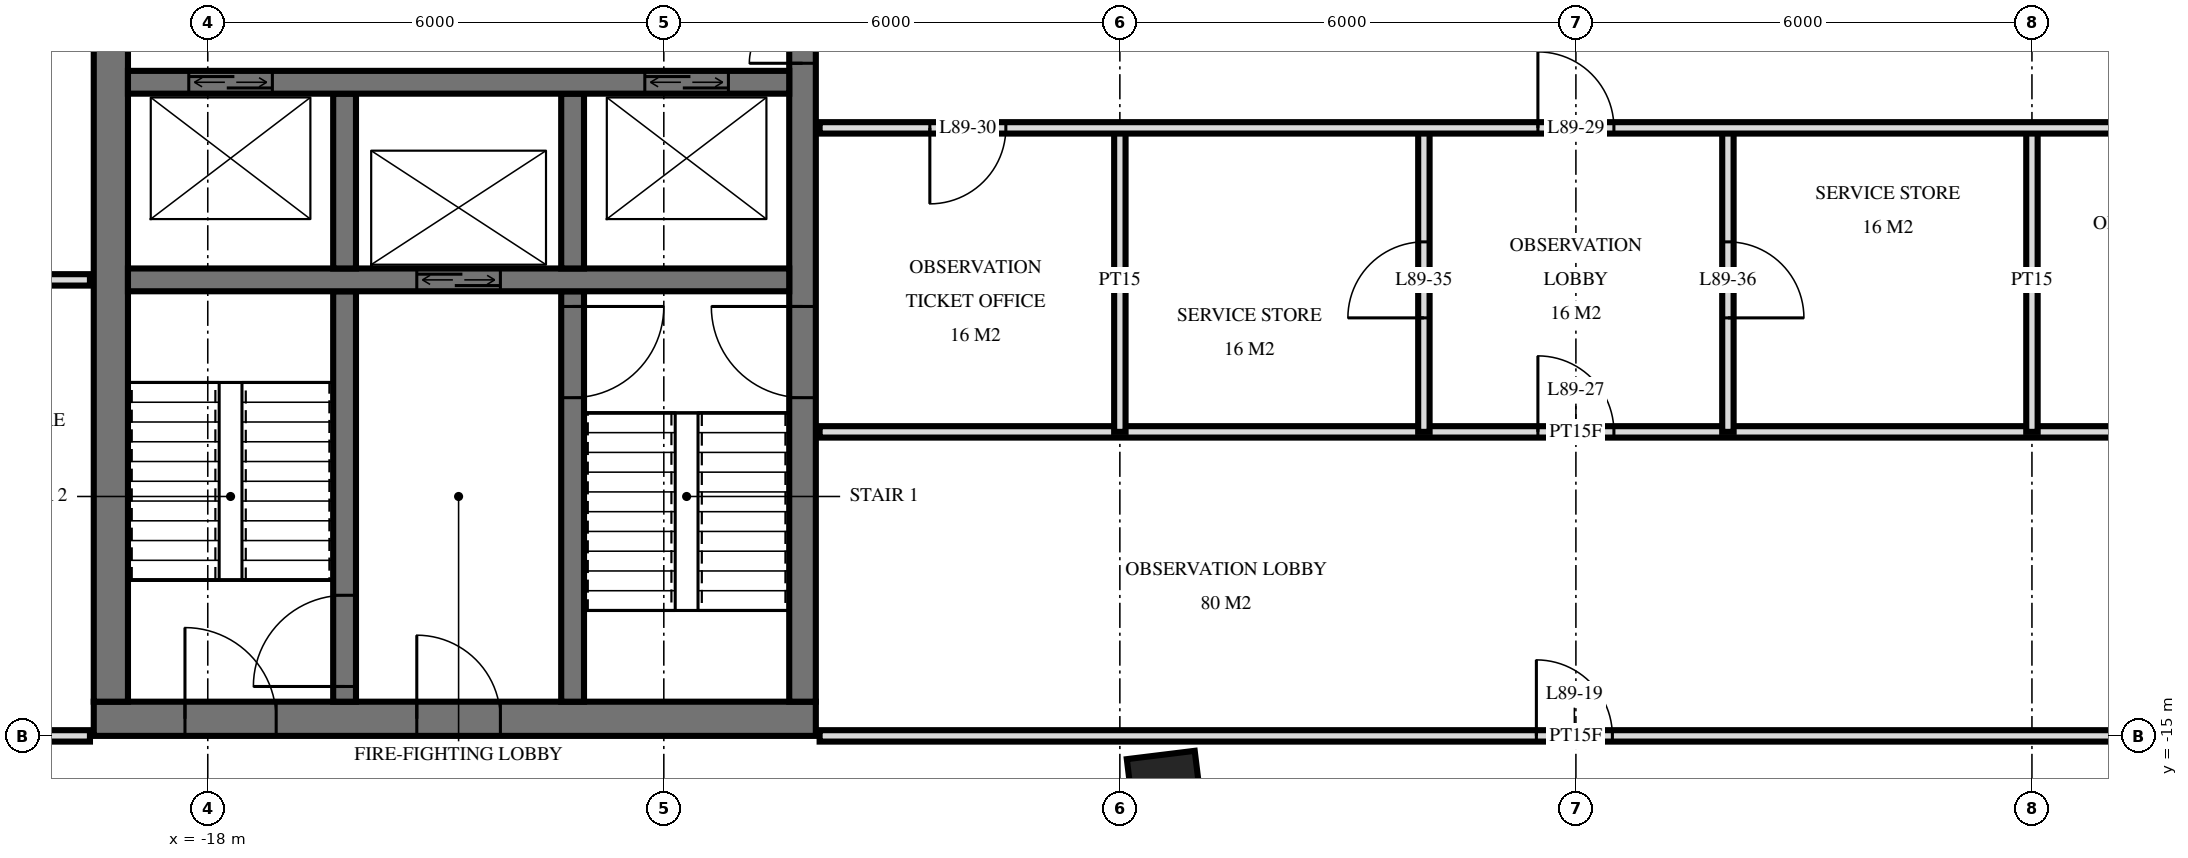
"""IFC4 building model, lengths in metres.
Left out: names, types, materials, properties, quantities, classifications, styles, units other than length and angle.
Written with IfcOpenShell. Run it as: python <this file> out.ifc"""

import sys

from ifc_helpers import new_model, si_unit, direction, frame, frame_2d, origin, origin_2d, place, context, subcontext, project, spatial, rectangle, extrude, element, fill, save


model = new_model("IFC4")
c1 = context("Model", 3, precision=1e-05, world=origin(), true_north=direction((0.0, 1.0)))
c2 = subcontext(c1, "Body", "Model", "MODEL_VIEW")
j1 = project(units=[si_unit("LENGTHUNIT", "METRE"), si_unit("PLANEANGLEUNIT", "RADIAN")], contexts=[c1])
p1 = place(None, origin())
s1 = spatial("IfcSite", under=j1, at=p1, CompositionType="ELEMENT")
p2 = place(p1, origin())
s2 = spatial("IfcBuilding", under=s1, at=p2, CompositionType="ELEMENT")
p3 = place(p2, frame((0.0, 0.0, 338.6)))
s3 = spatial("IfcBuildingStorey", under=s2, at=p3, CompositionType="ELEMENT", Elevation=338.6)
p4 = place(p3, frame((-5.407, -15.698, 0.0), z_axis=(0.0, 0.0, 1.0), x_axis=(0.992546151641, 0.121869343405, 0.0)))
e1 = element("IfcColumn", 1, at=p4, inside=s3, PredefinedType="COLUMN", context=c2, shape_type="SweptSolid", body=[
    extrude(rectangle(XDim=0.9, YDim=0.9, at=origin_2d()), origin(), (0.0, 0.0, 1.0), 4.0),
])
p5 = place(p3, frame((-19.5, -14.775, 0.0), z_axis=(0.0, 0.0, 1.0), x_axis=(1.0, 0.0, 0.0)))
e2 = element("IfcWall", 2, at=p5, inside=s3, PredefinedType="SHEAR", context=c2, shape_type="SweptSolid", body=[
    extrude(rectangle(XDim=9.5, YDim=0.45, at=frame_2d((4.75, 0.0))), origin(), (0.0, 0.0, 1.0), 4.0),
])
p6 = place(p5, frame((1.2, 0.0, 0.0)))
e3 = element("IfcOpeningElement", 3, at=p6, cuts=e2, PredefinedType="OPENING", context=c2, shape_type="SweptSolid", body=[
    extrude(rectangle(XDim=1.2, YDim=2.1, at=frame_2d((0.6, 1.05))), frame((0.0, 0.235, 0.0), z_axis=(0.0, -1.0, 0.0), x_axis=(1.0, 0.0, 0.0)), (0.0, 0.0, 1.0), 0.47),
])
p7 = place(p5, frame((4.25, 0.0, 0.0)))
e4 = element("IfcOpeningElement", 4, at=p7, cuts=e2, PredefinedType="OPENING", context=c2, shape_type="SweptSolid", body=[
    extrude(rectangle(XDim=1.1, YDim=2.1, at=frame_2d((0.55, 1.05))), frame((0.0, 0.235, 0.0), z_axis=(0.0, -1.0, 0.0), x_axis=(1.0, 0.0, 0.0)), (0.0, 0.0, 1.0), 0.47),
])
p8 = place(p3, frame((-10.175, -14.55, 0.0), z_axis=(0.0, 0.0, 1.0), x_axis=(0.0, 1.0, 0.0)))
e5 = element("IfcWall", 5, at=p8, inside=s3, PredefinedType="SHEAR", context=c2, shape_type="SweptSolid", body=[
    extrude(rectangle(XDim=14.1, YDim=0.35, at=frame_2d((7.05, 0.0))), origin(), (0.0, 0.0, 1.0), 4.0),
])
p9 = place(p8, frame((8.4, 0.0, 0.0)))
e6 = element("IfcOpeningElement", 6, at=p9, cuts=e5, PredefinedType="OPENING", context=c2, shape_type="SweptSolid", body=[
    extrude(rectangle(XDim=1.4, YDim=2.4, at=frame_2d((0.7, 1.2))), frame((0.0, 0.185, 0.0), z_axis=(0.0, -1.0, 0.0), x_axis=(1.0, 0.0, 0.0)), (0.0, 0.0, 1.0), 0.37),
])
p10 = place(p8, frame((10.0, 0.0, 0.0)))
e7 = element("IfcOpeningElement", 7, at=p10, cuts=e5, PredefinedType="OPENING", context=c2, shape_type="SweptSolid", body=[
    extrude(rectangle(XDim=1.4, YDim=2.4, at=frame_2d((0.7, 1.2))), frame((0.0, 0.185, 0.0), z_axis=(0.0, -1.0, 0.0), x_axis=(1.0, 0.0, 0.0)), (0.0, 0.0, 1.0), 0.37),
])
p11 = place(p8, frame((4.0, 0.0, 0.0)))
e8 = element("IfcOpeningElement", 8, at=p11, cuts=e5, PredefinedType="OPENING", context=c2, shape_type="SweptSolid", body=[
    extrude(rectangle(XDim=1.2, YDim=2.1, at=frame_2d((0.6, 1.05))), frame((0.0, 0.185, 0.0), z_axis=(0.0, -1.0, 0.0), x_axis=(1.0, 0.0, 0.0)), (0.0, 0.0, 1.0), 0.37),
])
p12 = place(p3, frame((-19.275, -14.55, 0.0), z_axis=(0.0, 0.0, 1.0), x_axis=(0.0, 1.0, 0.0)))
e9 = element("IfcWall", 9, at=p12, inside=s3, PredefinedType="SHEAR", context=c2, shape_type="SweptSolid", body=[
    extrude(rectangle(XDim=14.1, YDim=0.45, at=frame_2d((7.05, 0.0))), origin(), (0.0, 0.0, 1.0), 4.0),
])
p13 = place(p3, frame((-19.05, -6.4, 0.0), z_axis=(0.0, 0.0, 1.0), x_axis=(1.0, 0.0, 0.0)))
e10 = element("IfcWall", 10, at=p13, inside=s3, PredefinedType="SHEAR", context=c2, shape_type="SweptSolid", body=[
    extrude(rectangle(XDim=8.7, YDim=0.3, at=frame_2d((4.35, 0.0))), origin(), (0.0, 0.0, 1.0), 4.0),
])
p14 = place(p13, frame((6.8, 0.0, 0.0)))
e11 = element("IfcOpeningElement", 11, at=p14, cuts=e10, PredefinedType="OPENING", context=c2, shape_type="SweptSolid", body=[
    extrude(rectangle(XDim=1.1, YDim=2.1, at=frame_2d((0.55, 1.05))), frame((0.0, 0.16, 0.0), z_axis=(0.0, -1.0, 0.0), x_axis=(1.0, 0.0, 0.0)), (0.0, 0.0, 1.0), 0.32),
])
p15 = place(p13, frame((0.8, 0.0, 0.0)))
e12 = element("IfcOpeningElement", 12, at=p15, cuts=e10, PredefinedType="OPENING", context=c2, shape_type="SweptSolid", body=[
    extrude(rectangle(XDim=1.1, YDim=2.1, at=frame_2d((0.55, 1.05))), frame((0.0, 0.16, 0.0), z_axis=(0.0, -1.0, 0.0), x_axis=(1.0, 0.0, 0.0)), (0.0, 0.0, 1.0), 0.32),
])
p16 = place(p3, frame((-19.05, -9.0, 0.0), z_axis=(0.0, 0.0, 1.0), x_axis=(1.0, 0.0, 0.0)))
e13 = element("IfcWall", 13, at=p16, inside=s3, PredefinedType="SHEAR", context=c2, shape_type="SweptSolid", body=[
    extrude(rectangle(XDim=8.7, YDim=0.3, at=frame_2d((4.35, 0.0))), origin(), (0.0, 0.0, 1.0), 4.0),
])
p17 = place(p16, frame((3.8, 0.0, 0.0)))
e14 = element("IfcOpeningElement", 14, at=p17, cuts=e13, PredefinedType="OPENING", context=c2, shape_type="SweptSolid", body=[
    extrude(rectangle(XDim=1.1, YDim=2.1, at=frame_2d((0.55, 1.05))), frame((0.0, 0.16, 0.0), z_axis=(0.0, -1.0, 0.0), x_axis=(1.0, 0.0, 0.0)), (0.0, 0.0, 1.0), 0.32),
])
p18 = place(p3, frame((-13.2, -8.85, 0.0), z_axis=(0.0, 0.0, 1.0), x_axis=(0.0, 1.0, 0.0)))
e15 = element("IfcWall", 15, at=p18, inside=s3, PredefinedType="SHEAR", context=c2, shape_type="SweptSolid", body=[
    extrude(rectangle(XDim=2.3, YDim=0.3, at=frame_2d((1.15, 0.0))), origin(), (0.0, 0.0, 1.0), 4.0),
])
p19 = place(p3, frame((-13.2, -14.55, 0.0), z_axis=(0.0, 0.0, 1.0), x_axis=(0.0, 1.0, 0.0)))
e16 = element("IfcWall", 16, at=p19, inside=s3, PredefinedType="SHEAR", context=c2, shape_type="SweptSolid", body=[
    extrude(rectangle(XDim=5.4, YDim=0.3, at=frame_2d((2.7, 0.0))), origin(), (0.0, 0.0, 1.0), 4.0),
])
p20 = place(p19, frame((4.0, 0.0, 0.0)))
e17 = element("IfcOpeningElement", 17, at=p20, cuts=e16, PredefinedType="OPENING", context=c2, shape_type="SweptSolid", body=[
    extrude(rectangle(XDim=1.2, YDim=2.1, at=frame_2d((0.6, 1.05))), frame((0.0, 0.16, 0.0), z_axis=(0.0, -1.0, 0.0), x_axis=(1.0, 0.0, 0.0)), (0.0, 0.0, 1.0), 0.32),
])
p21 = place(p3, frame((-16.2, -8.85, 0.0), z_axis=(0.0, 0.0, 1.0), x_axis=(0.0, 1.0, 0.0)))
e18 = element("IfcWall", 18, at=p21, inside=s3, PredefinedType="SHEAR", context=c2, shape_type="SweptSolid", body=[
    extrude(rectangle(XDim=2.3, YDim=0.3, at=frame_2d((1.15, 0.0))), origin(), (0.0, 0.0, 1.0), 4.0),
])
p22 = place(p3, frame((-16.2, -14.55, 0.0), z_axis=(0.0, 0.0, 1.0), x_axis=(0.0, 1.0, 0.0)))
e19 = element("IfcWall", 19, at=p22, inside=s3, PredefinedType="SHEAR", context=c2, shape_type="SweptSolid", body=[
    extrude(rectangle(XDim=5.4, YDim=0.3, at=frame_2d((2.7, 0.0))), origin(), (0.0, 0.0, 1.0), 4.0),
])
p23 = place(p22, frame((0.2, 0.0, 0.0)))
e20 = element("IfcOpeningElement", 20, at=p23, cuts=e19, PredefinedType="OPENING", context=c2, shape_type="SweptSolid", body=[
    extrude(rectangle(XDim=1.2, YDim=2.1, at=frame_2d((0.6, 1.05))), frame((0.0, 0.16, 0.0), z_axis=(0.0, -1.0, 0.0), x_axis=(1.0, 0.0, 0.0)), (0.0, 0.0, 1.0), 0.32),
])
p24 = place(p3, frame((6.0, -11.0, 0.0), z_axis=(0.0, 0.0, 1.0), x_axis=(0.0, 1.0, 0.0)))
e21 = element("IfcWall", 21, at=p24, inside=s3, PredefinedType="PARTITIONING", context=c2, shape_type="SweptSolid", body=[
    extrude(rectangle(XDim=4.0, YDim=0.15, at=frame_2d((2.0, 0.0))), origin(), (0.0, 0.0, 1.0), 3.72),
])
p25 = place(p3, frame((2.0, -11.0, 0.0), z_axis=(0.0, 0.0, 1.0), x_axis=(0.0, 1.0, 0.0)))
e22 = element("IfcWall", 22, at=p25, inside=s3, PredefinedType="PARTITIONING", context=c2, shape_type="SweptSolid", body=[
    extrude(rectangle(XDim=4.0, YDim=0.15, at=frame_2d((2.0, 0.0))), origin(), (0.0, 0.0, 1.0), 3.72),
])
p26 = place(p25, frame((1.5, 0.0, 0.0)))
e23 = element("IfcOpeningElement", 23, at=p26, cuts=e22, PredefinedType="OPENING", context=c2, shape_type="SweptSolid", body=[
    extrude(rectangle(XDim=1.0, YDim=2.1, at=frame_2d((0.5, 1.05))), frame((0.0, 0.085, 0.0), z_axis=(0.0, -1.0, 0.0), x_axis=(1.0, 0.0, 0.0)), (0.0, 0.0, 1.0), 0.17),
])
p27 = place(p3, frame((-2.0, -11.0, 0.0), z_axis=(0.0, 0.0, 1.0), x_axis=(0.0, 1.0, 0.0)))
e24 = element("IfcWall", 24, at=p27, inside=s3, PredefinedType="PARTITIONING", context=c2, shape_type="SweptSolid", body=[
    extrude(rectangle(XDim=4.0, YDim=0.15, at=frame_2d((2.0, 0.0))), origin(), (0.0, 0.0, 1.0), 3.72),
])
p28 = place(p27, frame((1.5, 0.0, 0.0)))
e25 = element("IfcOpeningElement", 25, at=p28, cuts=e24, PredefinedType="OPENING", context=c2, shape_type="SweptSolid", body=[
    extrude(rectangle(XDim=1.0, YDim=2.1, at=frame_2d((0.5, 1.05))), frame((0.0, 0.085, 0.0), z_axis=(0.0, -1.0, 0.0), x_axis=(1.0, 0.0, 0.0)), (0.0, 0.0, 1.0), 0.17),
])
p29 = place(p3, frame((-6.0, -11.0, 0.0), z_axis=(0.0, 0.0, 1.0), x_axis=(0.0, 1.0, 0.0)))
e26 = element("IfcWall", 26, at=p29, inside=s3, PredefinedType="PARTITIONING", context=c2, shape_type="SweptSolid", body=[
    extrude(rectangle(XDim=4.0, YDim=0.15, at=frame_2d((2.0, 0.0))), origin(), (0.0, 0.0, 1.0), 3.72),
])
p30 = place(p3, frame((-21.935, -15.0, 0.0), z_axis=(0.0, 0.0, 1.0), x_axis=(1.0, 0.0, 0.0)))
e27 = element("IfcWall", 27, at=p30, inside=s3, PredefinedType="PARTITIONING", context=c2, shape_type="SweptSolid", body=[
    extrude(rectangle(XDim=2.385, YDim=0.15, at=frame_2d((1.192, 0.0))), origin(), (0.0, 0.0, 1.0), 3.72),
])
p31 = place(p30, frame((0.627, 0.0, 0.0)))
e28 = element("IfcOpeningElement", 28, at=p31, cuts=e27, PredefinedType="OPENING", context=c2, shape_type="SweptSolid", body=[
    extrude(rectangle(XDim=1.0, YDim=2.1, at=frame_2d((0.5, 1.05))), frame((0.0, 0.085, 0.0), z_axis=(0.0, -1.0, 0.0), x_axis=(1.0, 0.0, 0.0)), (0.0, 0.0, 1.0), 0.17),
])
p32 = place(p3, frame((-9.95, -15.0, 0.0), z_axis=(0.0, 0.0, 1.0), x_axis=(1.0, 0.0, 0.0)))
e29 = element("IfcWall", 29, at=p32, inside=s3, PredefinedType="PARTITIONING", context=c2, shape_type="SweptSolid", body=[
    extrude(rectangle(XDim=19.9, YDim=0.15, at=frame_2d((9.95, 0.0))), origin(), (0.0, 0.0, 1.0), 3.084),
])
p33 = place(p32, frame((9.43, 0.0, 0.0)))
e30 = element("IfcOpeningElement", 30, at=p33, cuts=e29, PredefinedType="OPENING", context=c2, shape_type="SweptSolid", body=[
    extrude(rectangle(XDim=1.0, YDim=2.1, at=frame_2d((0.5, 1.05))), frame((0.0, 0.085, 0.0), z_axis=(0.0, -1.0, 0.0), x_axis=(1.0, 0.0, 0.0)), (0.0, 0.0, 1.0), 0.17),
])
p34 = place(p3, frame((-9.95, -11.0, 0.0), z_axis=(0.0, 0.0, 1.0), x_axis=(1.0, 0.0, 0.0)))
e31 = element("IfcWall", 31, at=p34, inside=s3, PredefinedType="PARTITIONING", context=c2, shape_type="SweptSolid", body=[
    extrude(rectangle(XDim=19.9, YDim=0.15, at=frame_2d((9.95, 0.0))), origin(), (0.0, 0.0, 1.0), 3.72),
])
p35 = place(p34, frame((9.45, 0.0, 0.0)))
e32 = element("IfcOpeningElement", 32, at=p35, cuts=e31, PredefinedType="OPENING", context=c2, shape_type="SweptSolid", body=[
    extrude(rectangle(XDim=1.0, YDim=2.1, at=frame_2d((0.5, 1.05))), frame((0.0, 0.085, 0.0), z_axis=(0.0, -1.0, 0.0), x_axis=(1.0, 0.0, 0.0)), (0.0, 0.0, 1.0), 0.17),
])
p36 = place(p34, frame((17.45, 0.0, 0.0)))
e33 = element("IfcOpeningElement", 33, at=p36, cuts=e31, PredefinedType="OPENING", context=c2, shape_type="SweptSolid", body=[
    extrude(rectangle(XDim=1.0, YDim=2.1, at=frame_2d((0.5, 1.05))), frame((0.0, 0.085, 0.0), z_axis=(0.0, -1.0, 0.0), x_axis=(1.0, 0.0, 0.0)), (0.0, 0.0, 1.0), 0.17),
])
p37 = place(p3, frame((-22.672, -9.0, 0.0), z_axis=(0.0, 0.0, 1.0), x_axis=(1.0, 0.0, 0.0)))
e34 = element("IfcWall", 34, at=p37, inside=s3, PredefinedType="PARTITIONING", context=c2, shape_type="SweptSolid", body=[
    extrude(rectangle(XDim=3.122, YDim=0.15, at=frame_2d((1.561, 0.0))), origin(), (0.0, 0.0, 1.0), 3.72),
])
p38 = place(p37, frame((1.045, 0.0, 0.0)))
e35 = element("IfcOpeningElement", 35, at=p38, cuts=e34, PredefinedType="OPENING", context=c2, shape_type="SweptSolid", body=[
    extrude(rectangle(XDim=0.9, YDim=2.1, at=frame_2d((0.45, 1.05))), frame((0.0, 0.085, 0.0), z_axis=(0.0, -1.0, 0.0), x_axis=(1.0, 0.0, 0.0)), (0.0, 0.0, 1.0), 0.17),
])
p39 = place(p3, frame((-9.95, -7.0, 0.0), z_axis=(0.0, 0.0, 1.0), x_axis=(1.0, 0.0, 0.0)))
e36 = element("IfcWall", 36, at=p39, inside=s3, PredefinedType="PARTITIONING", context=c2, shape_type="SweptSolid", body=[
    extrude(rectangle(XDim=19.9, YDim=0.15, at=frame_2d((9.95, 0.0))), origin(), (0.0, 0.0, 1.0), 3.72),
])
p40 = place(p39, frame((9.45, 0.0, 0.0)))
e37 = element("IfcOpeningElement", 37, at=p40, cuts=e36, PredefinedType="OPENING", context=c2, shape_type="SweptSolid", body=[
    extrude(rectangle(XDim=1.0, YDim=2.1, at=frame_2d((0.5, 1.05))), frame((0.0, 0.085, 0.0), z_axis=(0.0, -1.0, 0.0), x_axis=(1.0, 0.0, 0.0)), (0.0, 0.0, 1.0), 0.17),
])
p41 = place(p39, frame((1.45, 0.0, 0.0)))
e38 = element("IfcOpeningElement", 38, at=p41, cuts=e36, PredefinedType="OPENING", context=c2, shape_type="SweptSolid", body=[
    extrude(rectangle(XDim=1.0, YDim=2.1, at=frame_2d((0.5, 1.05))), frame((0.0, 0.085, 0.0), z_axis=(0.0, -1.0, 0.0), x_axis=(1.0, 0.0, 0.0)), (0.0, 0.0, 1.0), 0.17),
])
p42 = place(p14, origin())
e39 = element("IfcDoor", 39, at=p42, inside=s3, OperationType="DOUBLE_DOOR_SLIDING", PredefinedType="USERDEFINED", context=c2, shape_type="SweptSolid", body=[
    extrude(rectangle(XDim=1.1, YDim=2.1, at=frame_2d((0.55, 1.05))), frame((0.0, 0.025, 0.0), z_axis=(0.0, -1.0, 0.0), x_axis=(1.0, 0.0, 0.0)), (0.0, 0.0, 1.0), 0.05),
])
fill(e11, e39)
p43 = place(p17, origin())
e40 = element("IfcDoor", 40, at=p43, inside=s3, OperationType="DOUBLE_DOOR_SLIDING", PredefinedType="USERDEFINED", context=c2, shape_type="SweptSolid", body=[
    extrude(rectangle(XDim=1.1, YDim=2.1, at=frame_2d((0.55, 1.05))), frame((0.0, 0.025, 0.0), z_axis=(0.0, -1.0, 0.0), x_axis=(1.0, 0.0, 0.0)), (0.0, 0.0, 1.0), 0.05),
])
fill(e14, e40)
p44 = place(p15, origin())
e41 = element("IfcDoor", 41, at=p44, inside=s3, OperationType="DOUBLE_DOOR_SLIDING", PredefinedType="USERDEFINED", context=c2, shape_type="SweptSolid", body=[
    extrude(rectangle(XDim=1.1, YDim=2.1, at=frame_2d((0.55, 1.05))), frame((0.0, 0.025, 0.0), z_axis=(0.0, -1.0, 0.0), x_axis=(1.0, 0.0, 0.0)), (0.0, 0.0, 1.0), 0.05),
])
fill(e12, e41)
p45 = place(p9, origin())
e42 = element("IfcDoor", 42, at=p45, inside=s3, OperationType="DOUBLE_DOOR_SINGLE_SWING", PredefinedType="DOOR", context=c2, shape_type="SweptSolid", body=[
    extrude(rectangle(XDim=1.4, YDim=2.4, at=frame_2d((0.7, 1.2))), frame((0.0, 0.025, 0.0), z_axis=(0.0, -1.0, 0.0), x_axis=(1.0, 0.0, 0.0)), (0.0, 0.0, 1.0), 0.05),
])
fill(e6, e42)
p46 = place(p11, origin())
e43 = element("IfcDoor", 43, at=p46, inside=s3, OperationType="SINGLE_SWING_LEFT", PredefinedType="DOOR", context=c2, shape_type="SweptSolid", body=[
    extrude(rectangle(XDim=1.2, YDim=2.1, at=frame_2d((0.6, 1.05))), frame((0.0, 0.025, 0.0), z_axis=(0.0, -1.0, 0.0), x_axis=(1.0, 0.0, 0.0)), (0.0, 0.0, 1.0), 0.05),
])
fill(e8, e43)
p47 = place(p6, origin())
e44 = element("IfcDoor", 44, at=p47, inside=s3, OperationType="SINGLE_SWING_RIGHT", PredefinedType="DOOR", context=c2, shape_type="SweptSolid", body=[
    extrude(rectangle(XDim=1.2, YDim=2.1, at=frame_2d((0.6, 1.05))), frame((0.0, 0.025, 0.0), z_axis=(0.0, -1.0, 0.0), x_axis=(1.0, 0.0, 0.0)), (0.0, 0.0, 1.0), 0.05),
])
fill(e3, e44)
p48 = place(p7, origin())
e45 = element("IfcDoor", 45, at=p48, inside=s3, OperationType="SINGLE_SWING_RIGHT", PredefinedType="DOOR", context=c2, shape_type="SweptSolid", body=[
    extrude(rectangle(XDim=1.1, YDim=2.1, at=frame_2d((0.55, 1.05))), frame((0.0, 0.025, 0.0), z_axis=(0.0, -1.0, 0.0), x_axis=(1.0, 0.0, 0.0)), (0.0, 0.0, 1.0), 0.05),
])
fill(e4, e45)
p49 = place(p20, frame((0.6, 0.0, 0.0), z_axis=(0.0, 0.0, 1.0), x_axis=(-1.0, 0.0, 0.0)))
e46 = element("IfcDoor", 46, at=p49, inside=s3, OperationType="SINGLE_SWING_RIGHT", PredefinedType="DOOR", context=c2, shape_type="SweptSolid", body=[
    extrude(rectangle(XDim=1.2, YDim=2.1, at=frame_2d((0.0, 1.05))), frame((0.0, -0.025, 0.0), z_axis=(0.0, 1.0, 0.0), x_axis=(-1.0, 0.0, 0.0)), (0.0, 0.0, 1.0), 0.05),
])
fill(e17, e46)
p50 = place(p23, origin())
e47 = element("IfcDoor", 47, at=p50, inside=s3, OperationType="SINGLE_SWING_RIGHT", PredefinedType="DOOR", context=c2, shape_type="SweptSolid", body=[
    extrude(rectangle(XDim=1.2, YDim=2.1, at=frame_2d((0.6, 1.05))), frame((0.0, 0.025, 0.0), z_axis=(0.0, -1.0, 0.0), x_axis=(1.0, 0.0, 0.0)), (0.0, 0.0, 1.0), 0.05),
])
fill(e20, e47)
p51 = place(p33, origin())
e48 = element("IfcDoor", 48, at=p51, inside=s3, OperationType="SINGLE_SWING_RIGHT", PredefinedType="DOOR", context=c2, shape_type="SweptSolid", body=[
    extrude(rectangle(XDim=1.0, YDim=2.1, at=frame_2d((0.5, 1.05))), frame((0.0, 0.025, 0.0), z_axis=(0.0, -1.0, 0.0), x_axis=(1.0, 0.0, 0.0)), (0.0, 0.0, 1.0), 0.05),
])
fill(e30, e48)
p52 = place(p35, origin())
e49 = element("IfcDoor", 49, at=p52, inside=s3, OperationType="SINGLE_SWING_RIGHT", PredefinedType="DOOR", context=c2, shape_type="SweptSolid", body=[
    extrude(rectangle(XDim=1.0, YDim=2.1, at=frame_2d((0.5, 1.05))), frame((0.0, 0.025, 0.0), z_axis=(0.0, -1.0, 0.0), x_axis=(1.0, 0.0, 0.0)), (0.0, 0.0, 1.0), 0.05),
])
fill(e32, e49)
p53 = place(p40, origin())
e50 = element("IfcDoor", 50, at=p53, inside=s3, OperationType="SINGLE_SWING_RIGHT", PredefinedType="DOOR", context=c2, shape_type="SweptSolid", body=[
    extrude(rectangle(XDim=1.0, YDim=2.1, at=frame_2d((0.5, 1.05))), frame((0.0, 0.025, 0.0), z_axis=(0.0, -1.0, 0.0), x_axis=(1.0, 0.0, 0.0)), (0.0, 0.0, 1.0), 0.05),
])
fill(e37, e50)
p54 = place(p41, frame((0.5, 0.0, 0.0), z_axis=(0.0, 0.0, 1.0), x_axis=(-1.0, 0.0, 0.0)))
e51 = element("IfcDoor", 51, at=p54, inside=s3, OperationType="SINGLE_SWING_LEFT", PredefinedType="DOOR", context=c2, shape_type="SweptSolid", body=[
    extrude(rectangle(XDim=1.0, YDim=2.1, at=frame_2d((0.0, 1.05))), frame((0.0, -0.025, 0.0), z_axis=(0.0, 1.0, 0.0), x_axis=(-1.0, 0.0, 0.0)), (0.0, 0.0, 1.0), 0.05),
])
fill(e38, e51)
p55 = place(p28, origin())
e52 = element("IfcDoor", 52, at=p55, inside=s3, OperationType="SINGLE_SWING_RIGHT", PredefinedType="DOOR", context=c2, shape_type="SweptSolid", body=[
    extrude(rectangle(XDim=1.0, YDim=2.1, at=frame_2d((0.5, 1.05))), frame((0.0, 0.025, 0.0), z_axis=(0.0, -1.0, 0.0), x_axis=(1.0, 0.0, 0.0)), (0.0, 0.0, 1.0), 0.05),
])
fill(e25, e52)
p56 = place(p26, frame((0.5, 0.0, 0.0), z_axis=(0.0, 0.0, 1.0), x_axis=(-1.0, 0.0, 0.0)))
e53 = element("IfcDoor", 53, at=p56, inside=s3, OperationType="SINGLE_SWING_LEFT", PredefinedType="DOOR", context=c2, shape_type="SweptSolid", body=[
    extrude(rectangle(XDim=1.0, YDim=2.1, at=frame_2d((0.0, 1.05))), frame((0.0, -0.025, 0.0), z_axis=(0.0, 1.0, 0.0), x_axis=(-1.0, 0.0, 0.0)), (0.0, 0.0, 1.0), 0.05),
])
fill(e23, e53)
save(model, sys.argv[1])
